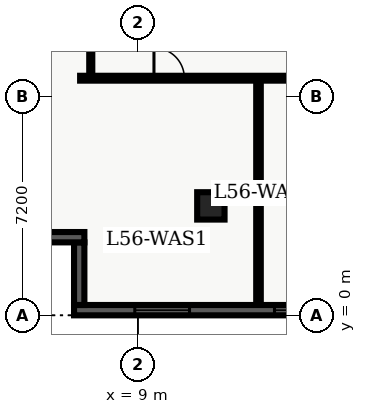
"""IFC4 building model, lengths in metres.
Left out: names, types, materials, properties, quantities, classifications, styles, units other than length and angle.
Written with IfcOpenShell. Run it as: python <this file> out.ifc"""

import sys

from ifc_helpers import new_model, entity, si_unit, converted_unit, direction, frame, origin_with_axes, origin_2d_with_axis, place, context, subcontext, project, spatial, polyline, rectangle, outline, extrude, element, fill, save


model = new_model("IFC4")
c1 = context("Model", 3, precision=1e-05, world=origin_with_axes(), true_north=direction((0.0, 1.0)))
c2 = subcontext(c1, "Body", "Model", "MODEL_VIEW")
j1 = project(units=[si_unit("LENGTHUNIT", "METRE"), converted_unit("PLANEANGLEUNIT", "DEGREE", entity("IfcPlaneAngleMeasure", 0.017), si_unit("PLANEANGLEUNIT", "RADIAN"), dimensions=[0, 0, 0, 0, 0, 0, 0])], contexts=[c1])
p1 = place(None, origin_with_axes())
s1 = spatial("IfcSite", under=j1, at=p1, CompositionType="ELEMENT")
p2 = place(p1, origin_with_axes())
s2 = spatial("IfcBuilding", under=s1, at=p2, CompositionType="ELEMENT")
p3 = place(p2, frame((0.0, 0.0, 228.6), z_axis=(0.0, 0.0, 1.0), x_axis=(1.0, 0.0, 0.0)))
s3 = spatial("IfcBuildingStorey", under=s2, at=p3, CompositionType="ELEMENT", Elevation=228.6)
p4 = place(p3, frame((11.4, 3.6, 0.0), z_axis=(0.0, 0.0, 1.0), x_axis=(1.0, 0.0, 0.0)))
e1 = element("IfcColumn", 1, at=p4, inside=s3, PredefinedType="COLUMN", context=c2, shape_type="SweptSolid", body=[
    extrude(rectangle(XDim=0.9, YDim=0.9, at=origin_2d_with_axis()), origin_with_axes(), (0.0, 0.0, 1.0), 3.9),
])
p5 = place(p3, frame((7.1, 7.8, 0.0), z_axis=(0.0, 0.0, 1.0), x_axis=(1.0, 0.0, 0.0)))
e2 = element("IfcWall", 2, at=p5, inside=s3, PredefinedType="PARTITIONING", context=c2, shape_type="SweptSolid", body=[
    extrude(outline(polyline([(0.0, -0.08), (13.2, -0.08), (13.2, 0.08), (0.0, 0.08), (0.0, -0.08)])), origin_with_axes(), (0.0, 0.0, 1.0), 2.7),
])
p6 = place(p5, frame((2.929, 0.0, 0.0), z_axis=(0.0, 0.0, 1.0), x_axis=(1.0, 0.0, 0.0)))
e3 = element("IfcOpeningElement", 3, at=p6, cuts=e2, PredefinedType="OPENING", context=c2, shape_type="SweptSolid", body=[
    extrude(rectangle(XDim=1.0, YDim=0.18, at=origin_2d_with_axis()), origin_with_axes(), (0.0, 0.0, 1.0), 2.15),
])
p7 = place(p5, frame((7.56, 0.0, 0.0), z_axis=(0.0, 0.0, 1.0), x_axis=(1.0, 0.0, 0.0)))
e4 = element("IfcOpeningElement", 4, at=p7, cuts=e2, PredefinedType="OPENING", context=c2, shape_type="SweptSolid", body=[
    extrude(rectangle(XDim=1.0, YDim=0.18, at=origin_2d_with_axis()), origin_with_axes(), (0.0, 0.0, 1.0), 2.15),
])
p8 = place(p5, frame((11.201, 0.0, 0.0), z_axis=(0.0, 0.0, 1.0), x_axis=(1.0, 0.0, 0.0)))
e5 = element("IfcOpeningElement", 5, at=p8, cuts=e2, PredefinedType="OPENING", context=c2, shape_type="SweptSolid", body=[
    extrude(rectangle(XDim=1.0, YDim=0.18, at=origin_2d_with_axis()), origin_with_axes(), (0.0, 0.0, 1.0), 2.15),
])
p9 = place(p3, frame((7.45, 7.8, 0.0), z_axis=(0.0, 0.0, 1.0), x_axis=(0.0, 1.0, 0.0)))
e6 = element("IfcWall", 6, at=p9, inside=s3, PredefinedType="PARTITIONING", context=c2, shape_type="SweptSolid", body=[
    extrude(outline(polyline([(0.0, -0.05), (32.7, -0.05), (32.7, 0.05), (0.0, 0.05), (0.0, -0.05)])), origin_with_axes(), (0.0, 0.0, 1.0), 2.7),
])
p10 = place(p9, frame((2.296, 0.0, 0.0), z_axis=(0.0, 0.0, 1.0), x_axis=(1.0, 0.0, 0.0)))
e7 = element("IfcOpeningElement", 7, at=p10, cuts=e6, PredefinedType="OPENING", context=c2, shape_type="SweptSolid", body=[
    extrude(rectangle(XDim=1.0, YDim=0.12, at=origin_2d_with_axis()), origin_with_axes(), (0.0, 0.0, 1.0), 2.15),
])
p11 = place(p9, frame((6.989, 0.0, 0.0), z_axis=(0.0, 0.0, 1.0), x_axis=(1.0, 0.0, 0.0)))
e8 = element("IfcOpeningElement", 8, at=p11, cuts=e6, PredefinedType="OPENING", context=c2, shape_type="SweptSolid", body=[
    extrude(rectangle(XDim=1.0, YDim=0.12, at=origin_2d_with_axis()), origin_with_axes(), (0.0, 0.0, 1.0), 2.15),
])
p12 = place(p9, frame((12.56, 0.0, 0.0), z_axis=(0.0, 0.0, 1.0), x_axis=(1.0, 0.0, 0.0)))
e9 = element("IfcOpeningElement", 9, at=p12, cuts=e6, PredefinedType="OPENING", context=c2, shape_type="SweptSolid", body=[
    extrude(rectangle(XDim=1.0, YDim=0.12, at=origin_2d_with_axis()), origin_with_axes(), (0.0, 0.0, 1.0), 2.15),
])
p13 = place(p9, frame((19.334, 0.0, 0.0), z_axis=(0.0, 0.0, 1.0), x_axis=(1.0, 0.0, 0.0)))
e10 = element("IfcOpeningElement", 10, at=p13, cuts=e6, PredefinedType="OPENING", context=c2, shape_type="SweptSolid", body=[
    extrude(rectangle(XDim=1.0, YDim=0.12, at=origin_2d_with_axis()), origin_with_axes(), (0.0, 0.0, 1.0), 2.15),
])
p14 = place(p9, frame((27.817, 0.0, 0.0), z_axis=(0.0, 0.0, 1.0), x_axis=(1.0, 0.0, 0.0)))
e11 = element("IfcOpeningElement", 11, at=p14, cuts=e6, PredefinedType="OPENING", context=c2, shape_type="SweptSolid", body=[
    extrude(rectangle(XDim=1.0, YDim=0.12, at=origin_2d_with_axis()), origin_with_axes(), (0.0, 0.0, 1.0), 2.15),
])
p15 = place(p3, frame((12.967, 0.335, 0.0), z_axis=(0.0, 0.0, 1.0), x_axis=(0.0, 1.0, 0.0)))
e12 = element("IfcWall", 12, at=p15, inside=s3, PredefinedType="PARTITIONING", context=c2, shape_type="SweptSolid", body=[
    extrude(outline(polyline([(0.0, -0.075), (7.365, -0.075), (7.365, 0.075), (0.0, 0.075), (0.0, -0.075)])), origin_with_axes(), (0.0, 0.0, 1.0), 2.7),
])
p16 = place(p3, frame((49.46, 0.17, 0.0), z_axis=(0.0, 0.0, 1.0), x_axis=(-1.0, 0.0, 0.0)))
e13 = element("IfcWall", 13, at=p16, inside=s3, PredefinedType="SOLIDWALL", context=c2, shape_type="SweptSolid", body=[
    extrude(outline(polyline([(0.0, -0.17), (42.56, -0.17), (42.56, 0.17), (0.0, 0.17), (0.0, -0.17)])), origin_with_axes(), (0.0, 0.0, 1.0), 3.66),
])
p17 = place(p16, frame((2.898, 0.0, 0.45), z_axis=(0.0, 0.0, 1.0), x_axis=(1.0, 0.0, 0.0)))
e14 = element("IfcOpeningElement", 14, at=p17, cuts=e13, PredefinedType="OPENING", context=c2, shape_type="SweptSolid", body=[
    extrude(rectangle(XDim=1.8, YDim=0.36, at=origin_2d_with_axis()), origin_with_axes(), (0.0, 0.0, 1.0), 2.1),
])
p18 = place(p16, frame((7.493, 0.0, 0.45), z_axis=(0.0, 0.0, 1.0), x_axis=(1.0, 0.0, 0.0)))
e15 = element("IfcOpeningElement", 15, at=p18, cuts=e13, PredefinedType="OPENING", context=c2, shape_type="SweptSolid", body=[
    extrude(rectangle(XDim=1.8, YDim=0.36, at=origin_2d_with_axis()), origin_with_axes(), (0.0, 0.0, 1.0), 2.1),
])
p19 = place(p16, frame((12.089, 0.0, 0.45), z_axis=(0.0, 0.0, 1.0), x_axis=(1.0, 0.0, 0.0)))
e16 = element("IfcOpeningElement", 16, at=p19, cuts=e13, PredefinedType="OPENING", context=c2, shape_type="SweptSolid", body=[
    extrude(rectangle(XDim=1.8, YDim=0.36, at=origin_2d_with_axis()), origin_with_axes(), (0.0, 0.0, 1.0), 2.1),
])
p20 = place(p16, frame((16.234, 0.0, 0.45), z_axis=(0.0, 0.0, 1.0), x_axis=(1.0, 0.0, 0.0)))
e17 = element("IfcOpeningElement", 17, at=p20, cuts=e13, PredefinedType="OPENING", context=c2, shape_type="SweptSolid", body=[
    extrude(rectangle(XDim=1.8, YDim=0.36, at=origin_2d_with_axis()), origin_with_axes(), (0.0, 0.0, 1.0), 2.1),
])
p21 = place(p16, frame((25.876, 0.0, 0.45), z_axis=(0.0, 0.0, 1.0), x_axis=(1.0, 0.0, 0.0)))
e18 = element("IfcOpeningElement", 18, at=p21, cuts=e13, PredefinedType="OPENING", context=c2, shape_type="SweptSolid", body=[
    extrude(rectangle(XDim=1.8, YDim=0.36, at=origin_2d_with_axis()), origin_with_axes(), (0.0, 0.0, 1.0), 2.1),
])
p22 = place(p16, frame((30.471, 0.0, 0.45), z_axis=(0.0, 0.0, 1.0), x_axis=(1.0, 0.0, 0.0)))
e19 = element("IfcOpeningElement", 19, at=p22, cuts=e13, PredefinedType="OPENING", context=c2, shape_type="SweptSolid", body=[
    extrude(rectangle(XDim=1.8, YDim=0.36, at=origin_2d_with_axis()), origin_with_axes(), (0.0, 0.0, 1.0), 2.1),
])
p23 = place(p16, frame((35.067, 0.0, 0.45), z_axis=(0.0, 0.0, 1.0), x_axis=(1.0, 0.0, 0.0)))
e20 = element("IfcOpeningElement", 20, at=p23, cuts=e13, PredefinedType="OPENING", context=c2, shape_type="SweptSolid", body=[
    extrude(rectangle(XDim=1.8, YDim=0.36, at=origin_2d_with_axis()), origin_with_axes(), (0.0, 0.0, 1.0), 2.1),
])
p24 = place(p16, frame((39.662, 0.0, 0.45), z_axis=(0.0, 0.0, 1.0), x_axis=(1.0, 0.0, 0.0)))
e21 = element("IfcOpeningElement", 21, at=p24, cuts=e13, PredefinedType="OPENING", context=c2, shape_type="SweptSolid", body=[
    extrude(rectangle(XDim=1.8, YDim=0.36, at=origin_2d_with_axis()), origin_with_axes(), (0.0, 0.0, 1.0), 2.1),
])
p25 = place(p3, frame((7.07, 0.34, 0.0), z_axis=(0.0, 0.0, 1.0), x_axis=(0.0, 1.0, 0.0)))
e22 = element("IfcWall", 22, at=p25, inside=s3, PredefinedType="SOLIDWALL", context=c2, shape_type="SweptSolid", body=[
    extrude(outline(polyline([(0.0, -0.17), (2.06, -0.17), (2.06, 0.17), (0.0, 0.17), (0.0, -0.17)])), origin_with_axes(), (0.0, 0.0, 1.0), 3.66),
])
p26 = place(p3, frame((7.24, 2.57, 0.0), z_axis=(0.0, 0.0, 1.0), x_axis=(-1.0, 0.0, 0.0)))
e23 = element("IfcWall", 23, at=p26, inside=s3, PredefinedType="SOLIDWALL", context=c2, shape_type="SweptSolid", body=[
    extrude(outline(polyline([(0.0, -0.17), (2.74, -0.17), (2.74, 0.17), (0.0, 0.17), (0.0, -0.17)])), origin_with_axes(), (0.0, 0.0, 1.0), 3.66),
])
p27 = place(p5, frame((2.929, 0.0, 0.0), z_axis=(0.0, 0.0, 1.0), x_axis=(1.0, 0.0, 0.0)))
e24 = element("IfcDoor", 24, at=p27, inside=s3, OperationType="SINGLE_SWING_LEFT", PredefinedType="DOOR", context=c2, shape_type="SweptSolid", body=[
    extrude(rectangle(XDim=1.0, YDim=0.09, at=origin_2d_with_axis()), origin_with_axes(), (0.0, 0.0, 1.0), 2.15),
])
fill(e3, e24)
p28 = place(p16, frame((35.067, 0.0, 0.45), z_axis=(0.0, 0.0, 1.0), x_axis=(1.0, 0.0, 0.0)))
e25 = element("IfcWindow", 25, at=p28, inside=s3, PredefinedType="WINDOW", context=c2, shape_type="SweptSolid", body=[
    extrude(rectangle(XDim=1.8, YDim=0.09, at=origin_2d_with_axis()), origin_with_axes(), (0.0, 0.0, 1.0), 2.1),
])
fill(e20, e25)
p29 = place(p16, frame((39.662, 0.0, 0.45), z_axis=(0.0, 0.0, 1.0), x_axis=(1.0, 0.0, 0.0)))
e26 = element("IfcWindow", 26, at=p29, inside=s3, PredefinedType="WINDOW", context=c2, shape_type="SweptSolid", body=[
    extrude(rectangle(XDim=1.8, YDim=0.09, at=origin_2d_with_axis()), origin_with_axes(), (0.0, 0.0, 1.0), 2.1),
])
fill(e21, e26)
save(model, sys.argv[1])
